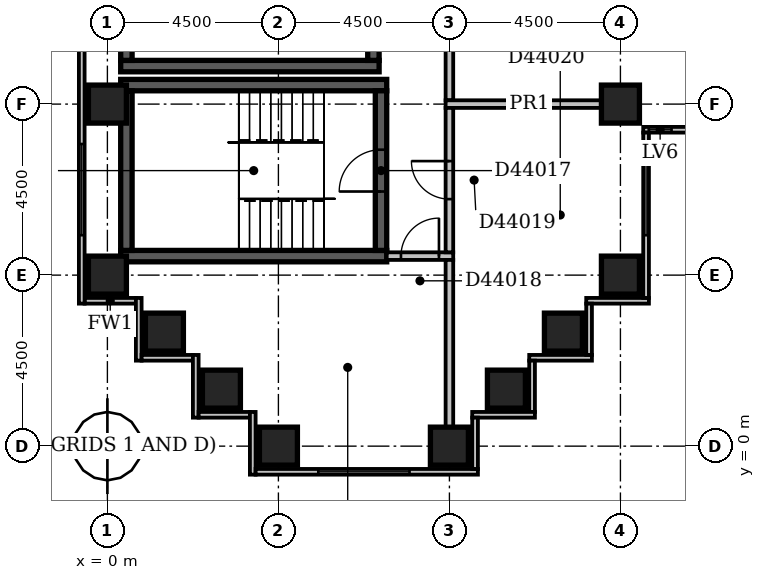
"""IFC4 building model, lengths in metres.
Left out: names, types, materials, properties, quantities, classifications, styles, units other than length and angle.
Written with IfcOpenShell. Run it as: python <this file> out.ifc"""

import sys

from ifc_helpers import new_model, si_unit, direction, frame, frame_2d, origin, origin_2d, place, context, subcontext, project, spatial, rectangle, extrude, element, fill, save


model = new_model("IFC4")
c1 = context("Model", 3, precision=1e-05, world=origin(), true_north=direction((0.0, 1.0)))
c2 = subcontext(c1, "Body", "Model", "MODEL_VIEW")
j1 = project(units=[si_unit("LENGTHUNIT", "METRE"), si_unit("PLANEANGLEUNIT", "RADIAN")], contexts=[c1])
p1 = place(None, origin())
s1 = spatial("IfcSite", under=j1, at=p1, CompositionType="ELEMENT")
p2 = place(p1, origin())
s2 = spatial("IfcBuilding", under=s1, at=p2, CompositionType="ELEMENT")
p3 = place(p2, frame((0.0, 0.0, 173.6)))
s3 = spatial("IfcBuildingStorey", under=s2, at=p3, CompositionType="ELEMENT", Elevation=173.6)
for number, where, z_axis, x_axis in (
    (1, (0.35, 5.0, -0.45), (0.0, 0.0, 1.0), (1.0, 0.0, 0.0)),
    (2, (0.35, 9.5, -0.45), (0.0, 0.0, 1.0), (1.0, 0.0, 0.0)),
):
    element("IfcWall", number, at=place(p3, frame(where, z_axis=z_axis, x_axis=x_axis)), inside=s3, PredefinedType="SHEAR", context=c2, shape_type="SweptSolid", body=[
        extrude(rectangle(XDim=7.0, YDim=0.3, at=frame_2d((3.5, 0.0))), origin(), (0.0, 0.0, 1.0), 5.55),
    ])
p4 = place(p3, frame((0.35, 10.0, -0.45), z_axis=(0.0, 0.0, 1.0), x_axis=(1.0, 0.0, 0.0)))
e3 = element("IfcWall", 3, at=p4, inside=s3, PredefinedType="SHEAR", context=c2, shape_type="SweptSolid", body=[
    extrude(rectangle(XDim=6.8, YDim=0.3, at=frame_2d((3.4, 0.0))), origin(), (0.0, 0.0, 1.0), 5.55),
])
p5 = place(p3, frame((0.5, 5.15, -0.45), z_axis=(0.0, 0.0, 1.0), x_axis=(0.0, 1.0, 0.0)))
e4 = element("IfcWall", 4, at=p5, inside=s3, PredefinedType="SHEAR", context=c2, shape_type="SweptSolid", body=[
    extrude(rectangle(XDim=4.2, YDim=0.3, at=frame_2d((2.1, 0.0))), origin(), (0.0, 0.0, 1.0), 5.55),
])
p6 = place(p3, frame((0.5, 10.15, -0.45), z_axis=(0.0, 0.0, 1.0), x_axis=(0.0, 1.0, 0.0)))
e5 = element("IfcWall", 5, at=p6, inside=s3, PredefinedType="SHEAR", context=c2, shape_type="SweptSolid", body=[
    extrude(rectangle(XDim=3.7, YDim=0.3, at=frame_2d((1.85, 0.0))), origin(), (0.0, 0.0, 1.0), 5.55),
])
p7 = place(p3, frame((7.0, 10.15, -0.45), z_axis=(0.0, 0.0, 1.0), x_axis=(0.0, 1.0, 0.0)))
e6 = element("IfcWall", 6, at=p7, inside=s3, PredefinedType="SHEAR", context=c2, shape_type="SweptSolid", body=[
    extrude(rectangle(XDim=3.7, YDim=0.3, at=frame_2d((1.85, 0.0))), origin(), (0.0, 0.0, 1.0), 5.55),
])
p8 = place(p7, frame((1.35, 0.0, 0.45)))
e7 = element("IfcOpeningElement", 7, at=p8, cuts=e6, PredefinedType="OPENING", context=c2, shape_type="SweptSolid", body=[
    extrude(rectangle(XDim=1.0, YDim=2.1, at=frame_2d((0.5, 1.05))), frame((0.0, 0.162, 0.0), z_axis=(0.0, -1.0, 0.0), x_axis=(1.0, 0.0, 0.0)), (0.0, 0.0, 1.0), 0.324),
])
p9 = place(p3, frame((7.2, 5.15, -0.45), z_axis=(0.0, 0.0, 1.0), x_axis=(0.0, 1.0, 0.0)))
e8 = element("IfcWall", 8, at=p9, inside=s3, PredefinedType="SHEAR", context=c2, shape_type="SweptSolid", body=[
    extrude(rectangle(XDim=4.2, YDim=0.3, at=frame_2d((2.1, 0.0))), origin(), (0.0, 0.0, 1.0), 5.55),
])
p10 = place(p9, frame((1.55, 0.0, 0.45)))
e9 = element("IfcOpeningElement", 9, at=p10, cuts=e8, PredefinedType="OPENING", context=c2, shape_type="SweptSolid", body=[
    extrude(rectangle(XDim=1.1, YDim=2.1, at=frame_2d((0.55, 1.05))), frame((0.0, 0.162, 0.0), z_axis=(0.0, -1.0, 0.0), x_axis=(1.0, 0.0, 0.0)), (0.0, 0.0, 1.0), 0.324),
])
for number, where, z_axis, x_axis in (
    (10, (4.5, 0.0, -0.45), (0.0, 0.0, 1.0), (1.0, 0.0, 0.0)),
    (11, (9.0, 0.0, -0.45), (0.0, 0.0, 1.0), (1.0, 0.0, 0.0)),
    (12, (3.0, 1.5, -0.45), (0.0, 0.0, 1.0), (1.0, 0.0, 0.0)),
    (13, (10.5, 1.5, -0.45), (0.0, 0.0, 1.0), (1.0, 0.0, 0.0)),
    (14, (1.5, 3.0, -0.45), (0.0, 0.0, 1.0), (1.0, 0.0, 0.0)),
    (15, (12.0, 3.0, -0.45), (0.0, 0.0, 1.0), (1.0, 0.0, 0.0)),
    (16, (0.0, 4.5, -0.45), (0.0, 0.0, 1.0), (1.0, 0.0, 0.0)),
    (17, (13.5, 4.5, -0.45), (0.0, 0.0, 1.0), (1.0, 0.0, 0.0)),
    (18, (0.0, 9.0, -0.45), (0.0, 0.0, 1.0), (1.0, 0.0, 0.0)),
    (19, (13.5, 9.0, -0.45), (0.0, 0.0, 1.0), (1.0, 0.0, 0.0)),
):
    element("IfcColumn", number, at=place(p3, frame(where, z_axis=z_axis, x_axis=x_axis)), inside=s3, PredefinedType="COLUMN", context=c2, shape_type="SweptSolid", body=[
        extrude(rectangle(XDim=1.0, YDim=1.0, at=origin_2d()), origin(), (0.0, 0.0, 1.0), 5.55),
    ])
p11 = place(p3, frame((9.675, -0.6, 0.0), z_axis=(0.0, 0.0, 1.0), x_axis=(0.0, 1.0, 0.0)))
e20 = element("IfcWall", 20, at=p11, inside=s3, PredefinedType="STANDARD", context=c2, shape_type="SweptSolid", body=[
    extrude(rectangle(XDim=1.35, YDim=0.15, at=frame_2d((0.675, 0.0))), origin(), (0.0, 0.0, 1.0), 4.5),
])
p12 = place(p3, frame((9.6, 0.825, 0.0), z_axis=(0.0, 0.0, 1.0), x_axis=(1.0, 0.0, 0.0)))
e21 = element("IfcWall", 21, at=p12, inside=s3, PredefinedType="STANDARD", context=c2, shape_type="SweptSolid", body=[
    extrude(rectangle(XDim=1.65, YDim=0.15, at=frame_2d((0.825, 0.0))), origin(), (0.0, 0.0, 1.0), 4.5),
])
p13 = place(p3, frame((11.175, 0.9, 0.0), z_axis=(0.0, 0.0, 1.0), x_axis=(0.0, 1.0, 0.0)))
e22 = element("IfcWall", 22, at=p13, inside=s3, PredefinedType="STANDARD", context=c2, shape_type="SweptSolid", body=[
    extrude(rectangle(XDim=1.35, YDim=0.15, at=frame_2d((0.675, 0.0))), origin(), (0.0, 0.0, 1.0), 4.5),
])
p14 = place(p3, frame((11.1, 2.325, 0.0), z_axis=(0.0, 0.0, 1.0), x_axis=(1.0, 0.0, 0.0)))
e23 = element("IfcWall", 23, at=p14, inside=s3, PredefinedType="STANDARD", context=c2, shape_type="SweptSolid", body=[
    extrude(rectangle(XDim=1.65, YDim=0.15, at=frame_2d((0.825, 0.0))), origin(), (0.0, 0.0, 1.0), 4.5),
])
p15 = place(p3, frame((12.675, 2.4, 0.0), z_axis=(0.0, 0.0, 1.0), x_axis=(0.0, 1.0, 0.0)))
e24 = element("IfcWall", 24, at=p15, inside=s3, PredefinedType="STANDARD", context=c2, shape_type="SweptSolid", body=[
    extrude(rectangle(XDim=1.35, YDim=0.15, at=frame_2d((0.675, 0.0))), origin(), (0.0, 0.0, 1.0), 4.5),
])
p16 = place(p3, frame((12.6, 3.825, 0.0), z_axis=(0.0, 0.0, 1.0), x_axis=(1.0, 0.0, 0.0)))
e25 = element("IfcWall", 25, at=p16, inside=s3, PredefinedType="STANDARD", context=c2, shape_type="SweptSolid", body=[
    extrude(rectangle(XDim=1.65, YDim=0.15, at=frame_2d((0.825, 0.0))), origin(), (0.0, 0.0, 1.0), 4.5),
])
p17 = place(p3, frame((14.175, 3.9, 0.0), z_axis=(0.0, 0.0, 1.0), x_axis=(0.0, 1.0, 0.0)))
e26 = element("IfcWall", 26, at=p17, inside=s3, PredefinedType="STANDARD", context=c2, shape_type="SweptSolid", body=[
    extrude(rectangle(XDim=4.35, YDim=0.15, at=frame_2d((2.175, 0.0))), origin(), (0.0, 0.0, 1.0), 4.5),
])
p18 = place(p17, frame((1.65, 0.0, 0.6)))
e27 = element("IfcOpeningElement", 27, at=p18, cuts=e26, PredefinedType="OPENING", context=c2, shape_type="SweptSolid", body=[
    extrude(rectangle(XDim=2.4, YDim=2.4, at=frame_2d((1.2, 1.2))), frame((0.0, 0.087, 0.0), z_axis=(0.0, -1.0, 0.0), x_axis=(1.0, 0.0, 0.0)), (0.0, 0.0, 1.0), 0.174),
])
p19 = place(p3, frame((14.1, 8.325, 0.0), z_axis=(0.0, 0.0, 1.0), x_axis=(1.0, 0.0, 0.0)))
e28 = element("IfcWall", 28, at=p19, inside=s3, PredefinedType="STANDARD", context=c2, shape_type="SweptSolid", body=[
    extrude(rectangle(XDim=4.65, YDim=0.15, at=frame_2d((2.325, 0.0))), origin(), (0.0, 0.0, 1.0), 4.5),
])
p20 = place(p19, frame((0.145, 0.0, 0.6)))
e29 = element("IfcOpeningElement", 29, at=p20, cuts=e28, PredefinedType="OPENING", context=c2, shape_type="SweptSolid", body=[
    extrude(rectangle(XDim=0.6, YDim=2.4, at=frame_2d((0.3, 1.2))), frame((0.0, 0.087, 0.0), z_axis=(0.0, -1.0, 0.0), x_axis=(1.0, 0.0, 0.0)), (0.0, 0.0, 1.0), 0.174),
])
p21 = place(p3, frame((-0.675, 59.1, 0.0), z_axis=(0.0, 0.0, 1.0), x_axis=(0.0, -1.0, 0.0)))
e30 = element("IfcWall", 30, at=p21, inside=s3, PredefinedType="STANDARD", context=c2, shape_type="SweptSolid", body=[
    extrude(rectangle(XDim=55.35, YDim=0.15, at=frame_2d((27.675, 0.0))), origin(), (0.0, 0.0, 1.0), 4.5),
])
p22 = place(p21, frame((3.775, 0.0, 0.6)))
e31 = element("IfcOpeningElement", 31, at=p22, cuts=e30, PredefinedType="OPENING", context=c2, shape_type="SweptSolid", body=[
    extrude(rectangle(XDim=0.6, YDim=2.4, at=frame_2d((0.3, 1.2))), frame((0.0, 0.087, 0.0), z_axis=(0.0, -1.0, 0.0), x_axis=(1.0, 0.0, 0.0)), (0.0, 0.0, 1.0), 0.174),
])
p23 = place(p21, frame((7.588, 0.0, 0.6)))
e32 = element("IfcOpeningElement", 32, at=p23, cuts=e30, PredefinedType="OPENING", context=c2, shape_type="SweptSolid", body=[
    extrude(rectangle(XDim=1.2, YDim=2.4, at=frame_2d((0.6, 1.2))), frame((0.0, 0.087, 0.0), z_axis=(0.0, -1.0, 0.0), x_axis=(1.0, 0.0, 0.0)), (0.0, 0.0, 1.0), 0.174),
])
p24 = place(p21, frame((12.775, 0.0, 0.6)))
e33 = element("IfcOpeningElement", 33, at=p24, cuts=e30, PredefinedType="OPENING", context=c2, shape_type="SweptSolid", body=[
    extrude(rectangle(XDim=0.6, YDim=2.4, at=frame_2d((0.3, 1.2))), frame((0.0, 0.087, 0.0), z_axis=(0.0, -1.0, 0.0), x_axis=(1.0, 0.0, 0.0)), (0.0, 0.0, 1.0), 0.174),
])
p25 = place(p21, frame((15.15, 0.0, 0.6)))
e34 = element("IfcOpeningElement", 34, at=p25, cuts=e30, PredefinedType="OPENING", context=c2, shape_type="SweptSolid", body=[
    extrude(rectangle(XDim=2.4, YDim=2.4, at=frame_2d((1.2, 1.2))), frame((0.0, 0.087, 0.0), z_axis=(0.0, -1.0, 0.0), x_axis=(1.0, 0.0, 0.0)), (0.0, 0.0, 1.0), 0.174),
])
p26 = place(p21, frame((24.15, 0.0, 0.6)))
e35 = element("IfcOpeningElement", 35, at=p26, cuts=e30, PredefinedType="OPENING", context=c2, shape_type="SweptSolid", body=[
    extrude(rectangle(XDim=2.4, YDim=2.4, at=frame_2d((1.2, 1.2))), frame((0.0, 0.087, 0.0), z_axis=(0.0, -1.0, 0.0), x_axis=(1.0, 0.0, 0.0)), (0.0, 0.0, 1.0), 0.174),
])
p27 = place(p21, frame((30.775, 0.0, 0.6)))
e36 = element("IfcOpeningElement", 36, at=p27, cuts=e30, PredefinedType="OPENING", context=c2, shape_type="SweptSolid", body=[
    extrude(rectangle(XDim=0.6, YDim=2.4, at=frame_2d((0.3, 1.2))), frame((0.0, 0.087, 0.0), z_axis=(0.0, -1.0, 0.0), x_axis=(1.0, 0.0, 0.0)), (0.0, 0.0, 1.0), 0.174),
])
p28 = place(p21, frame((34.588, 0.0, 0.6)))
e37 = element("IfcOpeningElement", 37, at=p28, cuts=e30, PredefinedType="OPENING", context=c2, shape_type="SweptSolid", body=[
    extrude(rectangle(XDim=1.2, YDim=2.4, at=frame_2d((0.6, 1.2))), frame((0.0, 0.087, 0.0), z_axis=(0.0, -1.0, 0.0), x_axis=(1.0, 0.0, 0.0)), (0.0, 0.0, 1.0), 0.174),
])
p29 = place(p21, frame((39.775, 0.0, 0.6)))
e38 = element("IfcOpeningElement", 38, at=p29, cuts=e30, PredefinedType="OPENING", context=c2, shape_type="SweptSolid", body=[
    extrude(rectangle(XDim=0.6, YDim=2.4, at=frame_2d((0.3, 1.2))), frame((0.0, 0.087, 0.0), z_axis=(0.0, -1.0, 0.0), x_axis=(1.0, 0.0, 0.0)), (0.0, 0.0, 1.0), 0.174),
])
p30 = place(p21, frame((42.15, 0.0, 0.6)))
e39 = element("IfcOpeningElement", 39, at=p30, cuts=e30, PredefinedType="OPENING", context=c2, shape_type="SweptSolid", body=[
    extrude(rectangle(XDim=2.4, YDim=2.4, at=frame_2d((1.2, 1.2))), frame((0.0, 0.087, 0.0), z_axis=(0.0, -1.0, 0.0), x_axis=(1.0, 0.0, 0.0)), (0.0, 0.0, 1.0), 0.174),
])
p31 = place(p21, frame((51.15, 0.0, 0.6)))
e40 = element("IfcOpeningElement", 40, at=p31, cuts=e30, PredefinedType="OPENING", context=c2, shape_type="SweptSolid", body=[
    extrude(rectangle(XDim=2.4, YDim=2.4, at=frame_2d((1.2, 1.2))), frame((0.0, 0.087, 0.0), z_axis=(0.0, -1.0, 0.0), x_axis=(1.0, 0.0, 0.0)), (0.0, 0.0, 1.0), 0.174),
])
p32 = place(p3, frame((-0.6, 3.825, 0.0), z_axis=(0.0, 0.0, 1.0), x_axis=(1.0, 0.0, 0.0)))
e41 = element("IfcWall", 41, at=p32, inside=s3, PredefinedType="STANDARD", context=c2, shape_type="SweptSolid", body=[
    extrude(rectangle(XDim=1.35, YDim=0.15, at=frame_2d((0.675, 0.0))), origin(), (0.0, 0.0, 1.0), 4.5),
])
p33 = place(p3, frame((0.825, 3.9, 0.0), z_axis=(0.0, 0.0, 1.0), x_axis=(0.0, -1.0, 0.0)))
e42 = element("IfcWall", 42, at=p33, inside=s3, PredefinedType="STANDARD", context=c2, shape_type="SweptSolid", body=[
    extrude(rectangle(XDim=1.65, YDim=0.15, at=frame_2d((0.825, 0.0))), origin(), (0.0, 0.0, 1.0), 4.5),
])
p34 = place(p3, frame((0.9, 2.325, 0.0), z_axis=(0.0, 0.0, 1.0), x_axis=(1.0, 0.0, 0.0)))
e43 = element("IfcWall", 43, at=p34, inside=s3, PredefinedType="STANDARD", context=c2, shape_type="SweptSolid", body=[
    extrude(rectangle(XDim=1.35, YDim=0.15, at=frame_2d((0.675, 0.0))), origin(), (0.0, 0.0, 1.0), 4.5),
])
p35 = place(p3, frame((2.325, 2.4, 0.0), z_axis=(0.0, 0.0, 1.0), x_axis=(0.0, -1.0, 0.0)))
e44 = element("IfcWall", 44, at=p35, inside=s3, PredefinedType="STANDARD", context=c2, shape_type="SweptSolid", body=[
    extrude(rectangle(XDim=1.65, YDim=0.15, at=frame_2d((0.825, 0.0))), origin(), (0.0, 0.0, 1.0), 4.5),
])
p36 = place(p3, frame((2.4, 0.825, 0.0), z_axis=(0.0, 0.0, 1.0), x_axis=(1.0, 0.0, 0.0)))
e45 = element("IfcWall", 45, at=p36, inside=s3, PredefinedType="STANDARD", context=c2, shape_type="SweptSolid", body=[
    extrude(rectangle(XDim=1.35, YDim=0.15, at=frame_2d((0.675, 0.0))), origin(), (0.0, 0.0, 1.0), 4.5),
])
p37 = place(p3, frame((3.825, 0.9, 0.0), z_axis=(0.0, 0.0, 1.0), x_axis=(0.0, -1.0, 0.0)))
e46 = element("IfcWall", 46, at=p37, inside=s3, PredefinedType="STANDARD", context=c2, shape_type="SweptSolid", body=[
    extrude(rectangle(XDim=1.65, YDim=0.15, at=frame_2d((0.825, 0.0))), origin(), (0.0, 0.0, 1.0), 4.5),
])
p38 = place(p3, frame((3.9, -0.675, 0.0), z_axis=(0.0, 0.0, 1.0), x_axis=(1.0, 0.0, 0.0)))
e47 = element("IfcWall", 47, at=p38, inside=s3, PredefinedType="STANDARD", context=c2, shape_type="SweptSolid", body=[
    extrude(rectangle(XDim=5.85, YDim=0.15, at=frame_2d((2.925, 0.0))), origin(), (0.0, 0.0, 1.0), 4.5),
])
p39 = place(p38, frame((1.65, 0.0, 0.6)))
e48 = element("IfcOpeningElement", 48, at=p39, cuts=e47, PredefinedType="OPENING", context=c2, shape_type="SweptSolid", body=[
    extrude(rectangle(XDim=2.4, YDim=2.4, at=frame_2d((1.2, 1.2))), frame((0.0, 0.087, 0.0), z_axis=(0.0, -1.0, 0.0), x_axis=(1.0, 0.0, 0.0)), (0.0, 0.0, 1.0), 0.174),
])
p40 = place(p3, frame((9.0, 0.271, 0.0), z_axis=(0.0, 0.0, 1.0), x_axis=(0.0, 1.0, 0.0)))
e49 = element("IfcWall", 49, at=p40, inside=s3, PredefinedType="PARTITIONING", context=c2, shape_type="SweptSolid", body=[
    extrude(rectangle(XDim=4.629, YDim=0.2, at=frame_2d((2.314, 0.0))), origin(), (0.0, 0.0, 1.0), 5.1),
])
p41 = place(p3, frame((7.35, 5.0, 0.0), z_axis=(0.0, 0.0, 1.0), x_axis=(1.0, 0.0, 0.0)))
e50 = element("IfcWall", 50, at=p41, inside=s3, PredefinedType="PARTITIONING", context=c2, shape_type="SweptSolid", body=[
    extrude(rectangle(XDim=1.75, YDim=0.2, at=frame_2d((0.875, 0.0))), origin(), (0.0, 0.0, 1.0), 5.1),
])
p42 = place(p41, frame((0.375, 0.0, 0.0)))
e51 = element("IfcOpeningElement", 51, at=p42, cuts=e50, PredefinedType="OPENING", context=c2, shape_type="SweptSolid", body=[
    extrude(rectangle(XDim=1.0, YDim=2.1, at=frame_2d((0.5, 1.05))), frame((0.0, 0.112, 0.0), z_axis=(0.0, -1.0, 0.0), x_axis=(1.0, 0.0, 0.0)), (0.0, 0.0, 1.0), 0.224),
])
p43 = place(p3, frame((9.0, 5.1, 0.0), z_axis=(0.0, 0.0, 1.0), x_axis=(0.0, 1.0, 0.0)))
e52 = element("IfcWall", 52, at=p43, inside=s3, PredefinedType="PARTITIONING", context=c2, shape_type="SweptSolid", body=[
    extrude(rectangle(XDim=3.8, YDim=0.2, at=frame_2d((1.9, 0.0))), origin(), (0.0, 0.0, 1.0), 5.1),
])
p44 = place(p43, frame((1.4, 0.0, 0.0)))
e53 = element("IfcOpeningElement", 53, at=p44, cuts=e52, PredefinedType="OPENING", context=c2, shape_type="SweptSolid", body=[
    extrude(rectangle(XDim=1.0, YDim=2.1, at=frame_2d((0.5, 1.05))), frame((0.0, 0.112, 0.0), z_axis=(0.0, -1.0, 0.0), x_axis=(1.0, 0.0, 0.0)), (0.0, 0.0, 1.0), 0.224),
])
p45 = place(p3, frame((9.0, 9.1, 0.0), z_axis=(0.0, 0.0, 1.0), x_axis=(0.0, 1.0, 0.0)))
e54 = element("IfcWall", 54, at=p45, inside=s3, PredefinedType="PARTITIONING", context=c2, shape_type="SweptSolid", body=[
    extrude(rectangle(XDim=8.806, YDim=0.2, at=frame_2d((4.403, 0.0))), origin(), (0.0, 0.0, 1.0), 5.1),
])
p46 = place(p45, frame((3.803, 0.0, 0.0)))
e55 = element("IfcOpeningElement", 55, at=p46, cuts=e54, PredefinedType="OPENING", context=c2, shape_type="SweptSolid", body=[
    extrude(rectangle(XDim=1.2, YDim=2.1, at=frame_2d((0.6, 1.05))), frame((0.0, 0.112, 0.0), z_axis=(0.0, -1.0, 0.0), x_axis=(1.0, 0.0, 0.0)), (0.0, 0.0, 1.0), 0.224),
])
p47 = place(p3, frame((13.309, 9.0, 0.0), z_axis=(0.0, 0.0, 1.0), x_axis=(-1.0, 0.0, 0.0)))
e56 = element("IfcWall", 56, at=p47, inside=s3, PredefinedType="PARTITIONING", context=c2, shape_type="SweptSolid", body=[
    extrude(rectangle(XDim=4.409, YDim=0.2, at=frame_2d((2.204, 0.0))), origin(), (0.0, 0.0, 1.0), 5.1),
])
p48 = place(p18, origin())
e57 = element("IfcWindow", 57, at=p48, inside=s3, PartitioningType="SINGLE_PANEL", PredefinedType="USERDEFINED", context=c2, shape_type="SweptSolid", body=[
    extrude(rectangle(XDim=2.4, YDim=2.4, at=frame_2d((1.2, 1.2))), frame((0.0, 0.03, 0.0), z_axis=(0.0, -1.0, 0.0), x_axis=(1.0, 0.0, 0.0)), (0.0, 0.0, 1.0), 0.06),
])
fill(e27, e57)
p49 = place(p20, origin())
e58 = element("IfcWindow", 58, at=p49, inside=s3, PartitioningType="SINGLE_PANEL", PredefinedType="USERDEFINED", context=c2, shape_type="SweptSolid", body=[
    extrude(rectangle(XDim=0.6, YDim=2.4, at=frame_2d((0.3, 1.2))), frame((0.0, 0.03, 0.0), z_axis=(0.0, -1.0, 0.0), x_axis=(1.0, 0.0, 0.0)), (0.0, 0.0, 1.0), 0.06),
])
fill(e29, e58)
p50 = place(p31, origin())
e59 = element("IfcWindow", 59, at=p50, inside=s3, PartitioningType="SINGLE_PANEL", PredefinedType="USERDEFINED", context=c2, shape_type="SweptSolid", body=[
    extrude(rectangle(XDim=2.4, YDim=2.4, at=frame_2d((1.2, 1.2))), frame((0.0, 0.03, 0.0), z_axis=(0.0, -1.0, 0.0), x_axis=(1.0, 0.0, 0.0)), (0.0, 0.0, 1.0), 0.06),
])
fill(e40, e59)
p51 = place(p39, origin())
e60 = element("IfcWindow", 60, at=p51, inside=s3, PartitioningType="SINGLE_PANEL", PredefinedType="USERDEFINED", context=c2, shape_type="SweptSolid", body=[
    extrude(rectangle(XDim=2.4, YDim=2.4, at=frame_2d((1.2, 1.2))), frame((0.0, 0.03, 0.0), z_axis=(0.0, -1.0, 0.0), x_axis=(1.0, 0.0, 0.0)), (0.0, 0.0, 1.0), 0.06),
])
fill(e48, e60)
p52 = place(p10, origin())
e61 = element("IfcDoor", 61, at=p52, inside=s3, OperationType="SINGLE_SWING_LEFT", PredefinedType="DOOR", context=c2, shape_type="SweptSolid", body=[
    extrude(rectangle(XDim=1.1, YDim=2.1, at=frame_2d((0.55, 1.05))), frame((0.0, 0.025, 0.0), z_axis=(0.0, -1.0, 0.0), x_axis=(1.0, 0.0, 0.0)), (0.0, 0.0, 1.0), 0.05),
])
fill(e9, e61)
p53 = place(p42, frame((1.0, 0.0, 0.0), z_axis=(0.0, 0.0, 1.0), x_axis=(-1.0, 0.0, 0.0)))
e62 = element("IfcDoor", 62, at=p53, inside=s3, OperationType="SINGLE_SWING_LEFT", PredefinedType="DOOR", context=c2, shape_type="SweptSolid", body=[
    extrude(rectangle(XDim=1.0, YDim=2.1, at=frame_2d((0.5, 1.05))), frame((0.0, 0.025, 0.0), z_axis=(0.0, -1.0, 0.0), x_axis=(1.0, 0.0, 0.0)), (0.0, 0.0, 1.0), 0.05),
])
fill(e51, e62)
p54 = place(p44, frame((1.0, 0.0, 0.0), z_axis=(0.0, 0.0, 1.0), x_axis=(-1.0, 0.0, 0.0)))
e63 = element("IfcDoor", 63, at=p54, inside=s3, OperationType="SINGLE_SWING_LEFT", PredefinedType="DOOR", context=c2, shape_type="SweptSolid", body=[
    extrude(rectangle(XDim=1.0, YDim=2.1, at=frame_2d((0.5, 1.05))), frame((0.0, 0.025, 0.0), z_axis=(0.0, -1.0, 0.0), x_axis=(1.0, 0.0, 0.0)), (0.0, 0.0, 1.0), 0.05),
])
fill(e53, e63)
save(model, sys.argv[1])
